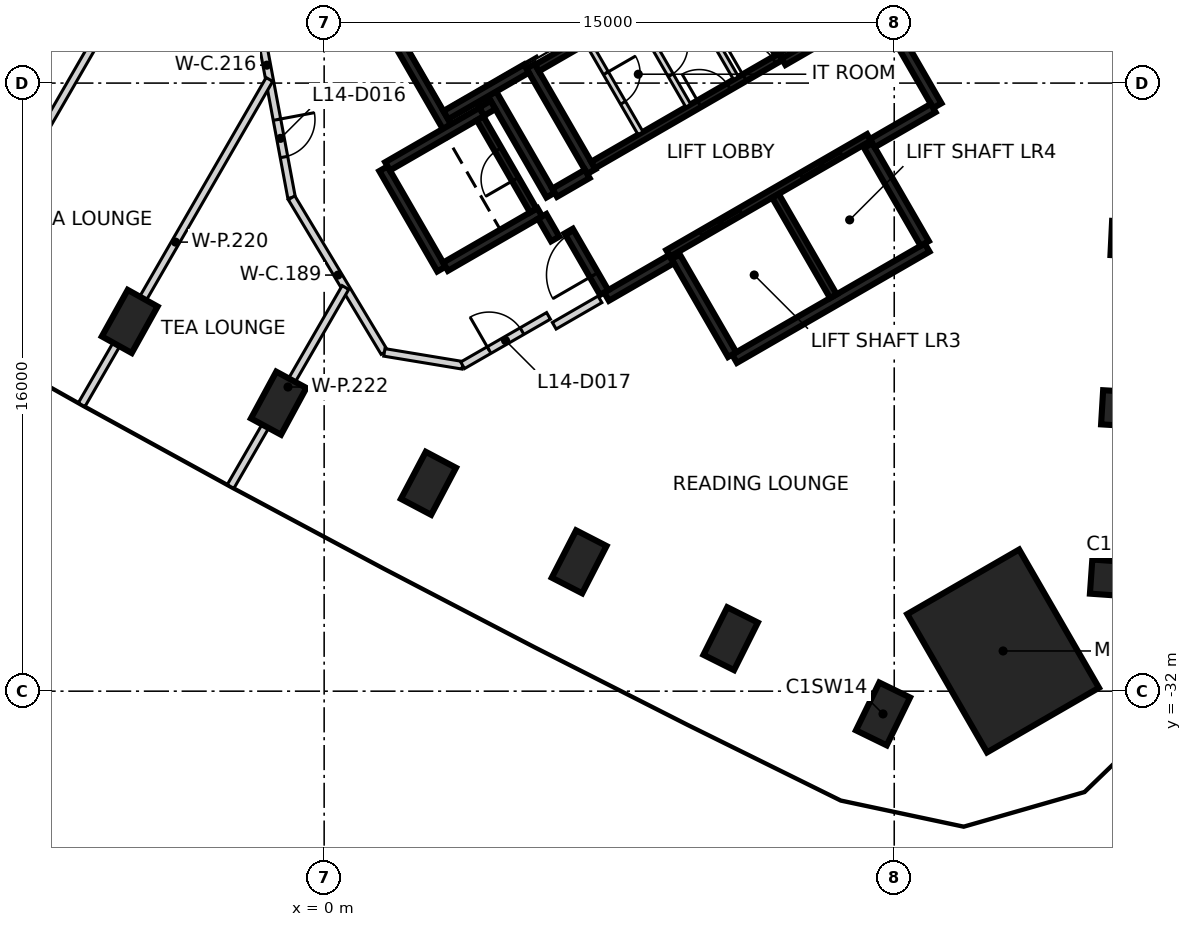
"""IFC4 building model, lengths in metres.
Left out: names, types, materials, properties, quantities, classifications, styles, units other than length and angle.
Written with IfcOpenShell. Run it as: python <this file> out.ifc"""

import sys

from ifc_helpers import new_model, si_unit, direction, frame, frame_2d, origin, origin_2d, place, context, subcontext, project, spatial, rectangle, extrude, element, fill, save


model = new_model("IFC4")
c1 = context("Model", 3, precision=1e-05, world=origin(), true_north=direction((0.0, 1.0)))
c2 = subcontext(c1, "Body", "Model", "MODEL_VIEW")
j1 = project(units=[si_unit("LENGTHUNIT", "METRE"), si_unit("PLANEANGLEUNIT", "RADIAN")], contexts=[c1])
p1 = place(None, origin())
s1 = spatial("IfcSite", under=j1, at=p1, CompositionType="ELEMENT")
p2 = place(p1, origin())
s2 = spatial("IfcBuilding", under=s1, at=p2, CompositionType="ELEMENT")
p3 = place(p2, frame((0.0, 0.0, 63.8)))
s3 = spatial("IfcBuildingStorey", under=s2, at=p3, CompositionType="ELEMENT", Elevation=63.8)
for number, where, z_axis, x_axis in (
    (1, (20.879, -29.034, -0.475), (0.0, 0.0, 1.0), (-0.998, 0.07, 0.0)),
    (2, (21.169, -24.573, -0.475), (0.0, 0.0, 1.0), (-0.998, 0.06, 0.0)),
    (3, (21.41, -20.109, -0.475), (0.0, 0.0, 1.0), (-0.999, 0.048, 0.0)),
    (4, (-5.116, -22.272, -0.475), (0.0, 0.0, 1.0), (0.486, 0.874, 0.0)),
    (5, (-1.197, -24.423, -0.475), (0.0, 0.0, 1.0), (0.476, 0.879, 0.0)),
    (6, (2.745, -26.531, -0.475), (0.0, 0.0, 1.0), (0.467, 0.884, 0.0)),
    (7, (6.71, -28.596, -0.475), (0.0, 0.0, 1.0), (0.458, 0.889, 0.0)),
    (8, (10.696, -30.619, -0.475), (0.0, 0.0, 1.0), (0.447, 0.894, 0.0)),
    (9, (14.705, -32.599, -0.475), (0.0, 0.0, 1.0), (0.438, 0.899, 0.0)),
):
    element("IfcColumn", number, at=place(p3, frame(where, z_axis=z_axis, x_axis=x_axis)), inside=s3, PredefinedType="COLUMN", context=c2, shape_type="SweptSolid", body=[
        extrude(rectangle(XDim=1.4, YDim=0.9, at=origin_2d()), origin(), (0.0, 0.0, 1.0), 3.6),
    ])
p4 = place(p3, frame((17.865, -30.942, -0.475), z_axis=(0.0, 0.0, 1.0), x_axis=(-0.5, 0.866025403784, 0.0)))
e10 = element("IfcColumn", 10, at=p4, inside=s3, PredefinedType="COLUMN", context=c2, shape_type="SweptSolid", body=[
    extrude(rectangle(XDim=4.2, YDim=3.4, at=origin_2d()), origin(), (0.0, 0.0, 1.0), 3.6),
])
p5 = place(p3, frame((13.008, -11.181, 0.0), z_axis=(0.0, 0.0, 1.0), x_axis=(0.500004234368, -0.866022959057, 0.0)))
e11 = element("IfcWall", 11, at=p5, inside=s3, PredefinedType="SHEAR", context=c2, shape_type="SweptSolid", body=[
    extrude(rectangle(XDim=6.25, YDim=0.25, at=frame_2d((3.125, 0.0))), origin(), (0.0, 0.0, 1.0), 3.125),
])
p6 = place(p3, frame((15.865, -20.328, 0.0), z_axis=(0.0, 0.0, 1.0), x_axis=(-0.86602852612, -0.499994591916, 0.0)))
e12 = element("IfcWall", 12, at=p6, inside=s3, PredefinedType="SHEAR", context=c2, shape_type="SweptSolid", body=[
    extrude(rectangle(XDim=5.85, YDim=0.25, at=frame_2d((2.925, 0.0))), origin(), (0.0, 0.0, 1.0), 3.125),
])
p7 = place(p3, frame((3.235, -17.153, 0.0), z_axis=(0.0, 0.0, 1.0), x_axis=(-0.500008851346, 0.866020293397, 0.0)))
e13 = element("IfcWall", 13, at=p7, inside=s3, PredefinedType="SHEAR", context=c2, shape_type="SweptSolid", body=[
    extrude(rectangle(XDim=5.51, YDim=0.25, at=frame_2d((2.755, 0.0))), origin(), (0.0, 0.0, 1.0), 3.125),
])
p8 = place(p3, frame((7.031, -18.327, 0.0), z_axis=(0.0, 0.0, 1.0), x_axis=(-0.499971222258, 0.866042017984, 0.0)))
e14 = element("IfcWall", 14, at=p8, inside=s3, PredefinedType="SHEAR", context=c2, shape_type="SweptSolid", body=[
    extrude(rectangle(XDim=3.2, YDim=0.25, at=frame_2d((1.6, 0.0))), origin(), (0.0, 0.0, 1.0), 3.125),
])
for number, where, z_axis, x_axis in (
    (15, (14.315, -17.644, 0.0), (0.0, 0.0, 1.0), (0.5, -0.866, 0.0)),
    (16, (10.736, -23.145, 0.0), (0.0, 0.0, 1.0), (-0.5, 0.866, 0.0)),
):
    element("IfcWall", number, at=place(p3, frame(where, z_axis=z_axis, x_axis=x_axis)), inside=s3, PredefinedType="SHEAR", context=c2, shape_type="SweptSolid", body=[
        extrude(rectangle(XDim=2.974, YDim=0.25, at=frame_2d((1.487, 0.0))), origin(), (0.0, 0.0, 1.0), 3.125),
    ])
p9 = place(p3, frame((3.085, -20.894, 0.0), z_axis=(0.0, 0.0, 1.0), x_axis=(-0.499978833458, 0.866037623948, 0.0)))
e17 = element("IfcWall", 17, at=p9, inside=s3, PredefinedType="SHEAR", context=c2, shape_type="SweptSolid", body=[
    extrude(rectangle(XDim=3.05, YDim=0.25, at=frame_2d((1.525, 0.0))), origin(), (0.0, 0.0, 1.0), 3.125),
])
p10 = place(p3, frame((1.669, -18.19, 0.0), z_axis=(0.0, 0.0, 1.0), x_axis=(0.866042235819, 0.499970844928, 0.0)))
e18 = element("IfcWall", 18, at=p10, inside=s3, PredefinedType="SHEAR", context=c2, shape_type="SweptSolid", body=[
    extrude(rectangle(XDim=2.865, YDim=0.25, at=frame_2d((1.432, 0.0))), origin(), (0.0, 0.0, 1.0), 3.125),
])
p11 = place(p3, frame((5.675, -19.399, 0.0), z_axis=(0.0, 0.0, 1.0), x_axis=(-0.866026637627, -0.499997862916, 0.0)))
e19 = element("IfcWall", 19, at=p11, inside=s3, PredefinedType="SHEAR", context=c2, shape_type="SweptSolid", body=[
    extrude(rectangle(XDim=2.865, YDim=0.25, at=frame_2d((1.432, 0.0))), origin(), (0.0, 0.0, 1.0), 3.125),
])
p12 = place(p3, frame((4.414, -16.276, 0.0), z_axis=(0.0, 0.0, 1.0), x_axis=(0.500003324108, -0.866023484601, 0.0)))
e20 = element("IfcWall", 20, at=p12, inside=s3, PredefinedType="SHEAR", context=c2, shape_type="SweptSolid", body=[
    extrude(rectangle(XDim=3.085, YDim=0.25, at=frame_2d((1.542, 0.0))), origin(), (0.0, 0.0, 1.0), 3.125),
])
p13 = place(p3, frame((5.322, -15.619, 0.0), z_axis=(0.0, 0.0, 1.0), x_axis=(-0.866026229868, -0.499998569178, 0.0)))
e21 = element("IfcWall", 21, at=p13, inside=s3, PredefinedType="SHEAR", context=c2, shape_type="SweptSolid", body=[
    extrude(rectangle(XDim=2.449, YDim=0.25, at=frame_2d((1.225, 0.0))), origin(), (0.0, 0.0, 1.0), 3.125),
])
p14 = place(p3, frame((9.14, -20.631, 0.0), z_axis=(0.0, 0.0, 1.0), x_axis=(-0.866043531843, -0.499968599967, 0.0)))
e22 = element("IfcWall", 22, at=p14, inside=s3, PredefinedType="SHEAR", context=c2, shape_type="SweptSolid", body=[
    extrude(rectangle(XDim=1.975, YDim=0.25, at=frame_2d((0.987, 0.0))), origin(), (0.0, 0.0, 1.0), 3.125),
])
p15 = place(p3, frame((16.025, -16.656, 0.0), z_axis=(0.0, 0.0, 1.0), x_axis=(-0.866016279763, -0.500015802937, 0.0)))
e23 = element("IfcWall", 23, at=p15, inside=s3, PredefinedType="SHEAR", context=c2, shape_type="SweptSolid", body=[
    extrude(rectangle(XDim=1.849, YDim=0.25, at=frame_2d((0.925, 0.0))), origin(), (0.0, 0.0, 1.0), 3.125),
])
p16 = place(p3, frame((7.367, -21.51, 0.0), z_axis=(0.0, 0.0, 1.0), x_axis=(-0.499983108224, 0.866035156036, 0.0)))
e24 = element("IfcWall", 24, at=p16, inside=s3, PredefinedType="SHEAR", context=c2, shape_type="SweptSolid", body=[
    extrude(rectangle(XDim=1.865, YDim=0.25, at=frame_2d((0.932, 0.0))), origin(), (0.0, 0.0, 1.0), 3.125),
])
p17 = place(p16, frame((0.535, 0.0, 0.0)))
e25 = element("IfcOpeningElement", 25, at=p17, cuts=e24, PredefinedType="OPENING", context=c2, shape_type="SweptSolid", body=[
    extrude(rectangle(XDim=1.25, YDim=2.1, at=frame_2d((0.625, 1.05))), frame((0.0, 0.135, 0.0), z_axis=(0.0, -1.0, 0.0), x_axis=(1.0, 0.0, 0.0)), (0.0, 0.0, 1.0), 0.27),
])
p18 = place(p3, frame((6.065, -18.885, 0.0), z_axis=(0.0, 0.0, 1.0), x_axis=(0.866017078145, 0.500014420154, 0.0)))
e26 = element("IfcWall", 26, at=p18, inside=s3, PredefinedType="SHEAR", context=c2, shape_type="SweptSolid", body=[
    extrude(rectangle(XDim=0.989, YDim=0.25, at=frame_2d((0.495, 0.0))), origin(), (0.0, 0.0, 1.0), 3.125),
])
p19 = place(p3, frame((6.08, -20.1, 0.0), z_axis=(0.0, 0.0, 1.0), x_axis=(-0.500051773299, 0.865995510393, 0.0)))
e27 = element("IfcWall", 27, at=p19, inside=s3, PredefinedType="SHEAR", context=c2, shape_type="SweptSolid", body=[
    extrude(rectangle(XDim=0.685, YDim=0.25, at=frame_2d((0.342, 0.0))), origin(), (0.0, 0.0, 1.0), 3.125),
])
p20 = place(p3, frame((4.145, -16.749, 0.0), z_axis=(0.0, 0.0, 1.0), x_axis=(0.866185586049, 0.49972245349, 0.0)))
e28 = element("IfcWall", 28, at=p20, inside=s3, PredefinedType="SHEAR", context=c2, shape_type="SweptSolid", body=[
    extrude(rectangle(XDim=0.344, YDim=0.25, at=frame_2d((0.172, 0.0))), origin(), (0.0, 0.0, 1.0), 3.125),
])
p21 = place(p3, frame((9.052, -20.48, 0.0), z_axis=(0.0, 0.0, 1.0), x_axis=(0.866030299012, 0.499991521122, 0.0)))
e29 = element("IfcWall", 29, at=p21, inside=s3, PredefinedType="SHEAR", context=c2, shape_type="SweptSolid", body=[
    extrude(rectangle(XDim=6.1, YDim=0.2, at=frame_2d((3.05, 0.0))), origin(), (0.0, 0.0, 1.0), 3.125),
])
p22 = place(p21, frame((1.0, 0.0, 0.0)))
e30 = element("IfcOpeningElement", 30, at=p22, cuts=e29, PredefinedType="OPENING", context=c2, shape_type="SweptSolid", body=[
    extrude(rectangle(XDim=1.2, YDim=2.1, at=frame_2d((0.6, 1.05))), frame((0.0, 0.11, 0.0), z_axis=(0.0, -1.0, 0.0), x_axis=(1.0, 0.0, 0.0)), (0.0, 0.0, 1.0), 0.22),
])
p23 = place(p21, frame((4.05, 0.0, 0.0)))
e31 = element("IfcOpeningElement", 31, at=p23, cuts=e29, PredefinedType="OPENING", context=c2, shape_type="SweptSolid", body=[
    extrude(rectangle(XDim=1.2, YDim=2.1, at=frame_2d((0.6, 1.05))), frame((0.0, 0.11, 0.0), z_axis=(0.0, -1.0, 0.0), x_axis=(1.0, 0.0, 0.0)), (0.0, 0.0, 1.0), 0.22),
])
p24 = place(p3, frame((10.538, -12.752, 0.0), z_axis=(0.0, 0.0, 1.0), x_axis=(-0.866038630372, -0.499977090179, 0.0)))
e32 = element("IfcWall", 32, at=p24, inside=s3, PredefinedType="SHEAR", context=c2, shape_type="SweptSolid", body=[
    extrude(rectangle(XDim=5.699, YDim=0.2, at=frame_2d((2.85, 0.0))), origin(), (0.0, 0.0, 1.0), 3.125),
])
p25 = place(p3, frame((7.077, -18.156, 0.0), z_axis=(0.0, 0.0, 1.0), x_axis=(0.866038630372, 0.499977090179, 0.0)))
e33 = element("IfcWall", 33, at=p25, inside=s3, PredefinedType="SHEAR", context=c2, shape_type="SweptSolid", body=[
    extrude(rectangle(XDim=5.699, YDim=0.2, at=frame_2d((2.85, 0.0))), origin(), (0.0, 0.0, 1.0), 3.125),
])
p26 = place(p25, frame((3.224, 0.0, 0.0)))
e34 = element("IfcOpeningElement", 34, at=p26, cuts=e33, PredefinedType="OPENING", context=c2, shape_type="SweptSolid", body=[
    extrude(rectangle(XDim=0.9, YDim=2.1, at=frame_2d((0.45, 1.05))), frame((0.0, 0.11, 0.0), z_axis=(0.0, -1.0, 0.0), x_axis=(1.0, 0.0, 0.0)), (0.0, 0.0, 1.0), 0.22),
])
p27 = place(p25, frame((4.599, 0.0, 0.0)))
e35 = element("IfcOpeningElement", 35, at=p27, cuts=e33, PredefinedType="OPENING", context=c2, shape_type="SweptSolid", body=[
    extrude(rectangle(XDim=0.9, YDim=2.1, at=frame_2d((0.45, 1.05))), frame((0.0, 0.11, 0.0), z_axis=(0.0, -1.0, 0.0), x_axis=(1.0, 0.0, 0.0)), (0.0, 0.0, 1.0), 0.22),
])
p28 = place(p3, frame((11.875, -18.967, 0.0), z_axis=(0.0, 0.0, 1.0), x_axis=(0.49998131003, -0.866036194175, 0.0)))
e36 = element("IfcWall", 36, at=p28, inside=s3, PredefinedType="SHEAR", context=c2, shape_type="SweptSolid", body=[
    extrude(rectangle(XDim=3.048, YDim=0.2, at=frame_2d((1.524, 0.0))), origin(), (0.0, 0.0, 1.0), 3.125),
])
p29 = place(p3, frame((5.503, -19.352, 0.0), z_axis=(0.0, 0.0, 1.0), x_axis=(-0.499986818241, 0.866033014143, 0.0)))
e37 = element("IfcWall", 37, at=p29, inside=s3, PredefinedType="SHEAR", context=c2, shape_type="SweptSolid", body=[
    extrude(rectangle(XDim=2.798, YDim=0.2, at=frame_2d((1.399, 0.0))), origin(), (0.0, 0.0, 1.0), 3.125),
])
p30 = place(p29, frame((0.949, 0.0, 0.0)))
e38 = element("IfcOpeningElement", 38, at=p30, cuts=e37, PredefinedType="OPENING", context=c2, shape_type="SweptSolid", body=[
    extrude(rectangle(XDim=0.9, YDim=2.1, at=frame_2d((0.45, 1.05))), frame((0.0, 0.11, 0.0), z_axis=(0.0, -1.0, 0.0), x_axis=(1.0, 0.0, 0.0)), (0.0, 0.0, 1.0), 0.22),
])
p31 = place(p3, frame((11.963, -15.22, 0.0), z_axis=(0.0, 0.0, 1.0), x_axis=(-0.500034990121, 0.866005201286, 0.0)))
e39 = element("IfcWall", 39, at=p31, inside=s3, PredefinedType="SHEAR", context=c2, shape_type="SweptSolid", body=[
    extrude(rectangle(XDim=2.75, YDim=0.2, at=frame_2d((1.375, 0.0))), origin(), (0.0, 0.0, 1.0), 3.125),
])
p32 = place(p3, frame((14.512, -14.037, 0.0), z_axis=(0.0, 0.0, 1.0), x_axis=(-0.866044696403, -0.499966582715, 0.0)))
e40 = element("IfcWall", 40, at=p32, inside=s3, PredefinedType="SHEAR", context=c2, shape_type="SweptSolid", body=[
    extrude(rectangle(XDim=2.799, YDim=0.2, at=frame_2d((1.399, 0.0))), origin(), (0.0, 0.0, 1.0), 3.125),
])
p33 = place(p3, frame((8.207, -14.214, 0.0), z_axis=(0.0, 0.0, 1.0), x_axis=(0.50002746344, -0.86600954718, 0.0)))
e41 = element("IfcWall", 41, at=p33, inside=s3, PredefinedType="PARTITIONING", context=c2, shape_type="SweptSolid", body=[
    extrude(rectangle(XDim=2.748, YDim=0.15, at=frame_2d((1.374, 0.0))), origin(), (0.0, 0.0, 1.0), 3.125),
])
p34 = place(p33, frame((0.924, 0.0, 0.0)))
e42 = element("IfcOpeningElement", 42, at=p34, cuts=e41, PredefinedType="OPENING", context=c2, shape_type="SweptSolid", body=[
    extrude(rectangle(XDim=0.9, YDim=2.1, at=frame_2d((0.45, 1.05))), frame((0.0, 0.085, 0.0), z_axis=(0.0, -1.0, 0.0), x_axis=(1.0, 0.0, 0.0)), (0.0, 0.0, 1.0), 0.17),
])
p35 = place(p3, frame((9.462, -13.489, 0.0), z_axis=(0.0, 0.0, 1.0), x_axis=(0.499988999718, -0.866031754707, 0.0)))
e43 = element("IfcWall", 43, at=p35, inside=s3, PredefinedType="PARTITIONING", context=c2, shape_type="SweptSolid", body=[
    extrude(rectangle(XDim=2.749, YDim=0.15, at=frame_2d((1.374, 0.0))), origin(), (0.0, 0.0, 1.0), 3.125),
])
p36 = place(p3, frame((6.951, -14.939, 0.0), z_axis=(0.0, 0.0, 1.0), x_axis=(0.499988999718, -0.866031754707, 0.0)))
e44 = element("IfcWall", 44, at=p36, inside=s3, PredefinedType="PARTITIONING", context=c2, shape_type="SweptSolid", body=[
    extrude(rectangle(XDim=2.749, YDim=0.15, at=frame_2d((1.374, 0.0))), origin(), (0.0, 0.0, 1.0), 3.125),
])
p37 = place(p36, frame((0.924, 0.0, 0.0)))
e45 = element("IfcOpeningElement", 45, at=p37, cuts=e44, PredefinedType="OPENING", context=c2, shape_type="SweptSolid", body=[
    extrude(rectangle(XDim=0.9, YDim=2.1, at=frame_2d((0.45, 1.05))), frame((0.0, 0.085, 0.0), z_axis=(0.0, -1.0, 0.0), x_axis=(1.0, 0.0, 0.0)), (0.0, 0.0, 1.0), 0.17),
])
p38 = place(p3, frame((-2.162, -12.042, 0.0), z_axis=(0.0, 0.0, 1.0), x_axis=(0.183949825522, -0.982935634561, 0.0)))
e46 = element("IfcWall", 46, at=p38, inside=s3, PredefinedType="PARTITIONING", context=c2, shape_type="SweptSolid", body=[
    extrude(rectangle(XDim=7.094, YDim=0.2, at=frame_2d((3.547, 0.0))), origin(), (0.0, 0.0, 1.0), 3.125),
])
p39 = place(p38, frame((5.006, 0.0, 0.0)))
e47 = element("IfcOpeningElement", 47, at=p39, cuts=e46, PredefinedType="OPENING", context=c2, shape_type="SweptSolid", body=[
    extrude(rectangle(XDim=1.0, YDim=2.1, at=frame_2d((0.5, 1.05))), frame((0.0, 0.11, 0.0), z_axis=(0.0, -1.0, 0.0), x_axis=(1.0, 0.0, 0.0)), (0.0, 0.0, 1.0), 0.22),
])
p40 = place(p3, frame((-0.858, -19.017, 0.0), z_axis=(0.0, 0.0, 1.0), x_axis=(0.514647068805, -0.857402119528, 0.0)))
e48 = element("IfcWall", 48, at=p40, inside=s3, PredefinedType="PARTITIONING", context=c2, shape_type="SweptSolid", body=[
    extrude(rectangle(XDim=4.745, YDim=0.2, at=frame_2d((2.373, 0.0))), origin(), (0.0, 0.0, 1.0), 3.125),
])
p41 = place(p3, frame((1.584, -23.086, 0.0), z_axis=(0.0, 0.0, 1.0), x_axis=(0.986633159246, -0.162957077405, 0.0)))
e49 = element("IfcWall", 49, at=p41, inside=s3, PredefinedType="PARTITIONING", context=c2, shape_type="SweptSolid", body=[
    extrude(rectangle(XDim=2.087, YDim=0.2, at=frame_2d((1.043, 0.0))), origin(), (0.0, 0.0, 1.0), 3.125),
])
p42 = place(p3, frame((3.643, -23.426, 0.0), z_axis=(0.0, 0.0, 1.0), x_axis=(0.866654350985, 0.498909045738, 0.0)))
e50 = element("IfcWall", 50, at=p42, inside=s3, PredefinedType="PARTITIONING", context=c2, shape_type="SweptSolid", body=[
    extrude(rectangle(XDim=2.608, YDim=0.2, at=frame_2d((1.304, 0.0))), origin(), (0.0, 0.0, 1.0), 3.125),
])
p43 = place(p42, frame((0.804, 0.0, 0.0)))
e51 = element("IfcOpeningElement", 51, at=p43, cuts=e50, PredefinedType="OPENING", context=c2, shape_type="SweptSolid", body=[
    extrude(rectangle(XDim=1.0, YDim=2.1, at=frame_2d((0.5, 1.05))), frame((0.0, 0.11, 0.0), z_axis=(0.0, -1.0, 0.0), x_axis=(1.0, 0.0, 0.0)), (0.0, 0.0, 1.0), 0.22),
])
p44 = place(p3, frame((6.054, -22.385, 0.0), z_axis=(0.0, 0.0, 1.0), x_axis=(0.86593101922, 0.500163443238, 0.0)))
e52 = element("IfcWall", 52, at=p44, inside=s3, PredefinedType="PARTITIONING", context=c2, shape_type="SweptSolid", body=[
    extrude(rectangle(XDim=1.39, YDim=0.2, at=frame_2d((0.695, 0.0))), origin(), (0.0, 0.0, 1.0), 3.125),
])
p45 = place(p3, frame((-14.148, -20.035, 0.0), z_axis=(0.0, 0.0, 1.0), x_axis=(0.500005855417, 0.866022023131, 0.0)))
e53 = element("IfcWall", 53, at=p45, inside=s3, PredefinedType="PARTITIONING", context=c2, shape_type="SweptSolid", body=[
    extrude(rectangle(XDim=17.425, YDim=0.2, at=frame_2d((8.712, 0.0))), origin(), (0.0, 0.0, 1.0), 3.125),
])
p46 = place(p3, frame((-10.276, -22.271, 0.0), z_axis=(0.0, 0.0, 1.0), x_axis=(0.49999372146, 0.866029028671, 0.0)))
e54 = element("IfcWall", 54, at=p46, inside=s3, PredefinedType="PARTITIONING", context=c2, shape_type="SweptSolid", body=[
    extrude(rectangle(XDim=17.425, YDim=0.2, at=frame_2d((8.712, 0.0))), origin(), (0.0, 0.0, 1.0), 3.125),
])
p47 = place(p3, frame((-6.381, -24.464, 0.0), z_axis=(0.0, 0.0, 1.0), x_axis=(0.500007577232, 0.866021029023, 0.0)))
e55 = element("IfcWall", 55, at=p47, inside=s3, PredefinedType="PARTITIONING", context=c2, shape_type="SweptSolid", body=[
    extrude(rectangle(XDim=9.883, YDim=0.2, at=frame_2d((4.941, 0.0))), origin(), (0.0, 0.0, 1.0), 3.125),
])
p48 = place(p3, frame((-2.462, -26.615, 0.0), z_axis=(0.0, 0.0, 1.0), x_axis=(0.49992636536, 0.86606791259, 0.0)))
e56 = element("IfcWall", 56, at=p48, inside=s3, PredefinedType="PARTITIONING", context=c2, shape_type="SweptSolid", body=[
    extrude(rectangle(XDim=6.046, YDim=0.2, at=frame_2d((3.023, 0.0))), origin(), (0.0, 0.0, 1.0), 3.125),
])
p49 = place(p22, origin())
e57 = element("IfcDoor", 57, at=p49, inside=s3, OperationType="DOUBLE_DOOR_SLIDING", PredefinedType="DOOR", context=c2, shape_type="SweptSolid", body=[
    extrude(rectangle(XDim=1.2, YDim=2.1, at=frame_2d((0.6, 1.05))), frame((0.0, 0.025, 0.0), z_axis=(0.0, -1.0, 0.0), x_axis=(1.0, 0.0, 0.0)), (0.0, 0.0, 1.0), 0.05),
])
fill(e30, e57)
p50 = place(p23, origin())
e58 = element("IfcDoor", 58, at=p50, inside=s3, OperationType="DOUBLE_DOOR_SLIDING", PredefinedType="DOOR", context=c2, shape_type="SweptSolid", body=[
    extrude(rectangle(XDim=1.2, YDim=2.1, at=frame_2d((0.6, 1.05))), frame((0.0, 0.025, 0.0), z_axis=(0.0, -1.0, 0.0), x_axis=(1.0, 0.0, 0.0)), (0.0, 0.0, 1.0), 0.05),
])
fill(e31, e58)
p51 = place(p17, origin())
e59 = element("IfcDoor", 59, at=p51, inside=s3, OperationType="SINGLE_SWING_LEFT", PredefinedType="DOOR", context=c2, shape_type="SweptSolid", body=[
    extrude(rectangle(XDim=1.25, YDim=2.1, at=frame_2d((0.625, 1.05))), frame((0.0, 0.025, 0.0), z_axis=(0.0, -1.0, 0.0), x_axis=(1.0, 0.0, 0.0)), (0.0, 0.0, 1.0), 0.05),
])
fill(e25, e59)
p52 = place(p26, origin())
e60 = element("IfcDoor", 60, at=p52, inside=s3, OperationType="SINGLE_SWING_RIGHT", PredefinedType="DOOR", context=c2, shape_type="SweptSolid", body=[
    extrude(rectangle(XDim=0.9, YDim=2.1, at=frame_2d((0.45, 1.05))), frame((0.0, 0.025, 0.0), z_axis=(0.0, -1.0, 0.0), x_axis=(1.0, 0.0, 0.0)), (0.0, 0.0, 1.0), 0.05),
])
fill(e34, e60)
p53 = place(p27, origin())
e61 = element("IfcDoor", 61, at=p53, inside=s3, OperationType="SINGLE_SWING_LEFT", PredefinedType="DOOR", context=c2, shape_type="SweptSolid", body=[
    extrude(rectangle(XDim=0.9, YDim=2.1, at=frame_2d((0.45, 1.05))), frame((0.0, 0.025, 0.0), z_axis=(0.0, -1.0, 0.0), x_axis=(1.0, 0.0, 0.0)), (0.0, 0.0, 1.0), 0.05),
])
fill(e35, e61)
p54 = place(p30, origin())
e62 = element("IfcDoor", 62, at=p54, inside=s3, OperationType="SINGLE_SWING_RIGHT", PredefinedType="DOOR", context=c2, shape_type="SweptSolid", body=[
    extrude(rectangle(XDim=0.9, YDim=2.1, at=frame_2d((0.45, 1.05))), frame((0.0, 0.025, 0.0), z_axis=(0.0, -1.0, 0.0), x_axis=(1.0, 0.0, 0.0)), (0.0, 0.0, 1.0), 0.05),
])
fill(e38, e62)
p55 = place(p34, origin())
e63 = element("IfcDoor", 63, at=p55, inside=s3, OperationType="SINGLE_SWING_LEFT", PredefinedType="DOOR", context=c2, shape_type="SweptSolid", body=[
    extrude(rectangle(XDim=0.9, YDim=2.1, at=frame_2d((0.45, 1.05))), frame((0.0, 0.025, 0.0), z_axis=(0.0, -1.0, 0.0), x_axis=(1.0, 0.0, 0.0)), (0.0, 0.0, 1.0), 0.05),
])
fill(e42, e63)
p56 = place(p37, origin())
e64 = element("IfcDoor", 64, at=p56, inside=s3, OperationType="SINGLE_SWING_RIGHT", PredefinedType="DOOR", context=c2, shape_type="SweptSolid", body=[
    extrude(rectangle(XDim=0.9, YDim=2.1, at=frame_2d((0.45, 1.05))), frame((0.0, 0.025, 0.0), z_axis=(0.0, -1.0, 0.0), x_axis=(1.0, 0.0, 0.0)), (0.0, 0.0, 1.0), 0.05),
])
fill(e45, e64)
p57 = place(p39, frame((1.0, 0.0, 0.0), z_axis=(0.0, 0.0, 1.0), x_axis=(-1.0, 0.0, 0.0)))
e65 = element("IfcDoor", 65, at=p57, inside=s3, OperationType="SINGLE_SWING_LEFT", PredefinedType="DOOR", context=c2, shape_type="SweptSolid", body=[
    extrude(rectangle(XDim=1.0, YDim=2.1, at=frame_2d((0.5, 1.05))), frame((0.0, 0.025, 0.0), z_axis=(0.0, -1.0, 0.0), x_axis=(1.0, 0.0, 0.0)), (0.0, 0.0, 1.0), 0.05),
])
fill(e47, e65)
p58 = place(p43, frame((1.0, 0.0, 0.0), z_axis=(0.0, 0.0, 1.0), x_axis=(-1.0, 0.0, 0.0)))
e66 = element("IfcDoor", 66, at=p58, inside=s3, OperationType="SINGLE_SWING_LEFT", PredefinedType="DOOR", context=c2, shape_type="SweptSolid", body=[
    extrude(rectangle(XDim=1.0, YDim=2.1, at=frame_2d((0.5, 1.05))), frame((0.0, 0.025, 0.0), z_axis=(0.0, -1.0, 0.0), x_axis=(1.0, 0.0, 0.0)), (0.0, 0.0, 1.0), 0.05),
])
fill(e51, e66)
save(model, sys.argv[1])
